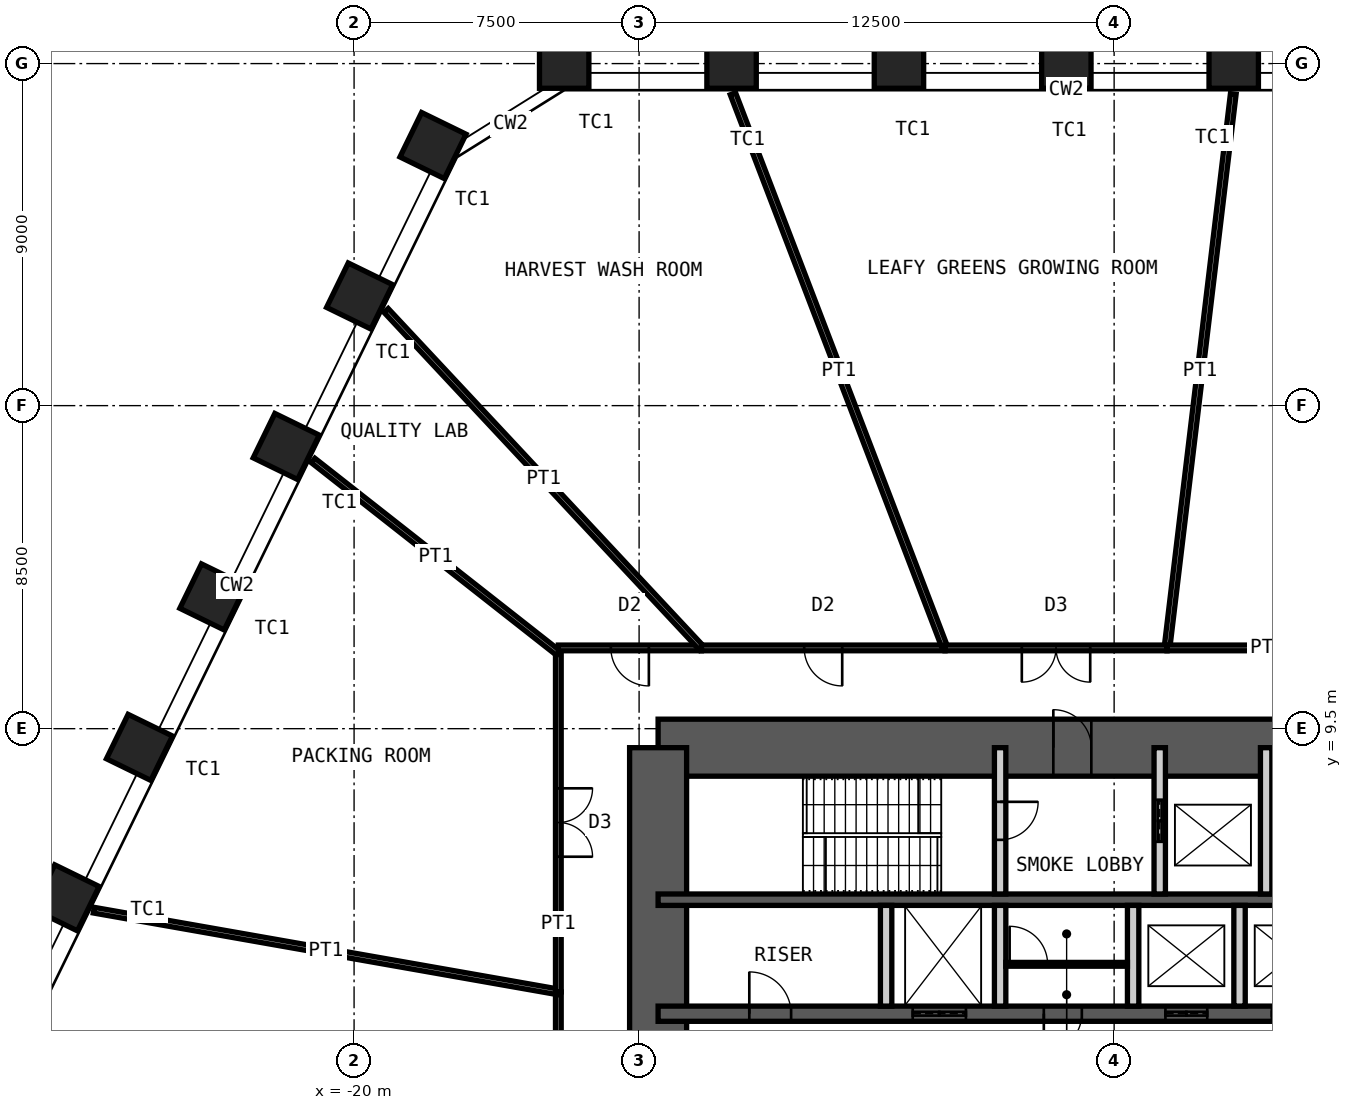
"""IFC4 building model, lengths in metres.
Left out: names, types, materials, properties, quantities, classifications, styles, units other than length and angle.
Written with IfcOpenShell. Run it as: python <this file> out.ifc"""

import sys

from ifc_helpers import new_model, si_unit, direction, frame, frame_2d, origin, origin_2d, place, context, subcontext, project, spatial, rectangle, hollow_rectangle, extrude, element, fill, save


model = new_model("IFC4")
c1 = context("Model", 3, precision=1e-05, world=origin(), true_north=direction((0.0, 1.0)))
c2 = subcontext(c1, "Body", "Model", "MODEL_VIEW")
j1 = project(units=[si_unit("LENGTHUNIT", "METRE"), si_unit("PLANEANGLEUNIT", "RADIAN")], contexts=[c1])
p1 = place(None, origin())
s1 = spatial("IfcSite", under=j1, at=p1, CompositionType="ELEMENT")
p2 = place(p1, origin())
s2 = spatial("IfcBuilding", under=s1, at=p2, CompositionType="ELEMENT")
p3 = place(p2, frame((0.0, 0.0, 37.0)))
s3 = spatial("IfcBuildingStorey", under=s2, at=p3, CompositionType="ELEMENT", Elevation=37.0)
for number, where, z_axis, x_axis in (
    (1, (-14.471, 27.0, 0.0), (0.0, 0.0, 1.0), (-1.0, 0.0, 0.0)),
    (2, (-10.067, 27.0, 0.0), (0.0, 0.0, 1.0), (-1.0, 0.0, 0.0)),
    (3, (-5.662, 27.0, 0.0), (0.0, 0.0, 1.0), (-1.0, 0.0, 0.0)),
    (4, (-1.258, 27.0, 0.0), (0.0, 0.0, 1.0), (-1.0, 0.0, 0.0)),
    (5, (3.147, 27.0, 0.0), (0.0, 0.0, 1.0), (-1.0, 0.0, 0.0)),
    (6, (-27.578, 5.049, 0.0), (0.0, 0.0, 1.0), (-0.438, -0.899, 0.0)),
    (7, (-25.647, 9.008, 0.0), (0.0, 0.0, 1.0), (-0.438, -0.899, 0.0)),
    (8, (-23.716, 12.966, 0.0), (0.0, 0.0, 1.0), (-0.438, -0.899, 0.0)),
    (9, (-21.785, 16.925, 0.0), (0.0, 0.0, 1.0), (-0.438, -0.899, 0.0)),
    (10, (-19.854, 20.884, 0.0), (0.0, 0.0, 1.0), (-0.438, -0.899, 0.0)),
    (11, (-17.924, 24.843, 0.0), (0.0, 0.0, 1.0), (-0.438, -0.899, 0.0)),
):
    element("IfcColumn", number, at=place(p3, frame(where, z_axis=z_axis, x_axis=x_axis)), inside=s3, PredefinedType="COLUMN", context=c2, shape_type="SweptSolid", body=[
        extrude(hollow_rectangle(XDim=1.3, YDim=1.3, WallThickness=0.1, at=origin_2d()), origin(), (0.0, 0.0, 1.0), 5.0),
    ])
p4 = place(p3, frame((-12.0, 9.0, 0.0), z_axis=(0.0, 0.0, 1.0), x_axis=(1.0, 0.0, 0.0)))
e12 = element("IfcWall", 12, at=p4, inside=s3, PredefinedType="SHEAR", context=c2, shape_type="SweptSolid", body=[
    extrude(rectangle(XDim=24.0, YDim=1.5, at=frame_2d((12.0, 0.0))), origin(), (0.0, 0.0, 1.0), 5.0),
])
p5 = place(p4, frame((10.4, 0.0, 0.0)))
e13 = element("IfcOpeningElement", 13, at=p5, cuts=e12, PredefinedType="OPENING", context=c2, shape_type="SweptSolid", body=[
    extrude(rectangle(XDim=1.0, YDim=2.1, at=frame_2d((0.5, 1.05))), frame((0.0, 0.76, 0.0), z_axis=(0.0, -1.0, 0.0), x_axis=(1.0, 0.0, 0.0)), (0.0, 0.0, 1.0), 1.52),
])
p6 = place(p4, frame((17.6, 0.0, 0.0)))
e14 = element("IfcOpeningElement", 14, at=p6, cuts=e12, PredefinedType="OPENING", context=c2, shape_type="SweptSolid", body=[
    extrude(rectangle(XDim=0.9, YDim=2.1, at=frame_2d((0.45, 1.05))), frame((0.0, 0.76, 0.0), z_axis=(0.0, -1.0, 0.0), x_axis=(1.0, 0.0, 0.0)), (0.0, 0.0, 1.0), 1.52),
])
p7 = place(p4, frame((21.9, 0.0, 0.0)))
e15 = element("IfcOpeningElement", 15, at=p7, cuts=e12, PredefinedType="OPENING", context=c2, shape_type="SweptSolid", body=[
    extrude(rectangle(XDim=0.9, YDim=2.1, at=frame_2d((0.45, 1.05))), frame((0.0, 0.76, 0.0), z_axis=(0.0, -1.0, 0.0), x_axis=(1.0, 0.0, 0.0)), (0.0, 0.0, 1.0), 1.52),
])
p8 = place(p3, frame((-12.0, -9.0, 0.0), z_axis=(0.0, 0.0, 1.0), x_axis=(0.0, 1.0, 0.0)))
e16 = element("IfcWall", 16, at=p8, inside=s3, PredefinedType="SHEAR", context=c2, shape_type="SweptSolid", body=[
    extrude(rectangle(XDim=18.0, YDim=1.5, at=frame_2d((9.0, 0.0))), origin(), (0.0, 0.0, 1.0), 5.0),
])
p9 = place(p8, frame((8.1, 0.0, 0.0)))
e17 = element("IfcOpeningElement", 17, at=p9, cuts=e16, PredefinedType="OPENING", context=c2, shape_type="SweptSolid", body=[
    extrude(rectangle(XDim=1.8, YDim=2.1, at=frame_2d((0.9, 1.05))), frame((0.0, 0.76, 0.0), z_axis=(0.0, -1.0, 0.0), x_axis=(1.0, 0.0, 0.0)), (0.0, 0.0, 1.0), 1.52),
])
p10 = place(p3, frame((-12.0, 5.0, 0.0), z_axis=(0.0, 0.0, 1.0), x_axis=(1.0, 0.0, 0.0)))
e18 = element("IfcWall", 18, at=p10, inside=s3, PredefinedType="SHEAR", context=c2, shape_type="SweptSolid", body=[
    extrude(rectangle(XDim=24.0, YDim=0.3, at=frame_2d((12.0, 0.0))), origin(), (0.0, 0.0, 1.0), 5.0),
])
p11 = place(p3, frame((-12.0, 2.0, 0.0), z_axis=(0.0, 0.0, 1.0), x_axis=(1.0, 0.0, 0.0)))
e19 = element("IfcWall", 19, at=p11, inside=s3, PredefinedType="SHEAR", context=c2, shape_type="SweptSolid", body=[
    extrude(rectangle(XDim=24.0, YDim=0.4, at=frame_2d((12.0, 0.0))), origin(), (0.0, 0.0, 1.0), 5.0),
])
p12 = place(p11, frame((2.4, 0.0, 0.0)))
e20 = element("IfcOpeningElement", 20, at=p12, cuts=e19, PredefinedType="OPENING", context=c2, shape_type="SweptSolid", body=[
    extrude(rectangle(XDim=1.1, YDim=2.1, at=frame_2d((0.55, 1.05))), frame((0.0, 0.21, 0.0), z_axis=(0.0, -1.0, 0.0), x_axis=(1.0, 0.0, 0.0)), (0.0, 0.0, 1.0), 0.42),
])
p13 = place(p11, frame((22.0, 0.0, 0.0)))
e21 = element("IfcOpeningElement", 21, at=p13, cuts=e19, PredefinedType="OPENING", context=c2, shape_type="SweptSolid", body=[
    extrude(rectangle(XDim=1.1, YDim=2.1, at=frame_2d((0.55, 1.05))), frame((0.0, 0.21, 0.0), z_axis=(0.0, -1.0, 0.0), x_axis=(1.0, 0.0, 0.0)), (0.0, 0.0, 1.0), 0.42),
])
p14 = place(p11, frame((10.15, 0.0, 0.0)))
e22 = element("IfcOpeningElement", 22, at=p14, cuts=e19, PredefinedType="OPENING", context=c2, shape_type="SweptSolid", body=[
    extrude(rectangle(XDim=1.0, YDim=2.1, at=frame_2d((0.5, 1.05))), frame((0.0, 0.21, 0.0), z_axis=(0.0, -1.0, 0.0), x_axis=(1.0, 0.0, 0.0)), (0.0, 0.0, 1.0), 0.42),
])
p15 = place(p11, frame((6.7, 0.0, 0.0)))
e23 = element("IfcOpeningElement", 23, at=p15, cuts=e19, PredefinedType="OPENING", context=c2, shape_type="SweptSolid", body=[
    extrude(rectangle(XDim=1.4, YDim=2.4, at=frame_2d((0.7, 1.2))), frame((0.0, 0.21, 0.0), z_axis=(0.0, -1.0, 0.0), x_axis=(1.0, 0.0, 0.0)), (0.0, 0.0, 1.0), 0.42),
])
p16 = place(p11, frame((13.35, 0.0, 0.0)))
e24 = element("IfcOpeningElement", 24, at=p16, cuts=e19, PredefinedType="OPENING", context=c2, shape_type="SweptSolid", body=[
    extrude(rectangle(XDim=1.1, YDim=2.4, at=frame_2d((0.55, 1.2))), frame((0.0, 0.21, 0.0), z_axis=(0.0, -1.0, 0.0), x_axis=(1.0, 0.0, 0.0)), (0.0, 0.0, 1.0), 0.42),
])
p17 = place(p11, frame((16.15, 0.0, 0.0)))
e25 = element("IfcOpeningElement", 25, at=p17, cuts=e19, PredefinedType="OPENING", context=c2, shape_type="SweptSolid", body=[
    extrude(rectangle(XDim=1.1, YDim=2.4, at=frame_2d((0.55, 1.2))), frame((0.0, 0.21, 0.0), z_axis=(0.0, -1.0, 0.0), x_axis=(1.0, 0.0, 0.0)), (0.0, 0.0, 1.0), 0.42),
])
p18 = place(p11, frame((18.95, 0.0, 0.0)))
e26 = element("IfcOpeningElement", 26, at=p18, cuts=e19, PredefinedType="OPENING", context=c2, shape_type="SweptSolid", body=[
    extrude(rectangle(XDim=1.1, YDim=2.4, at=frame_2d((0.55, 1.2))), frame((0.0, 0.21, 0.0), z_axis=(0.0, -1.0, 0.0), x_axis=(1.0, 0.0, 0.0)), (0.0, 0.0, 1.0), 0.42),
])
p19 = place(p3, frame((-3.0, 5.15, 0.0), z_axis=(0.0, 0.0, 1.0), x_axis=(0.0, 1.0, 0.0)))
e27 = element("IfcWall", 27, at=p19, inside=s3, PredefinedType="PARTITIONING", context=c2, shape_type="SweptSolid", body=[
    extrude(rectangle(XDim=3.85, YDim=0.3, at=frame_2d((1.925, 0.0))), origin(), (0.0, 0.0, 1.0), 4.78),
])
p20 = place(p19, frame((1.425, 0.0, 0.0)))
e28 = element("IfcOpeningElement", 28, at=p20, cuts=e27, PredefinedType="OPENING", context=c2, shape_type="SweptSolid", body=[
    extrude(rectangle(XDim=1.0, YDim=2.1, at=frame_2d((0.5, 1.05))), frame((0.0, 0.16, 0.0), z_axis=(0.0, -1.0, 0.0), x_axis=(1.0, 0.0, 0.0)), (0.0, 0.0, 1.0), 0.32),
])
p21 = place(p3, frame((1.2, 5.15, 0.0), z_axis=(0.0, 0.0, 1.0), x_axis=(0.0, 1.0, 0.0)))
e29 = element("IfcWall", 29, at=p21, inside=s3, PredefinedType="PARTITIONING", context=c2, shape_type="SweptSolid", body=[
    extrude(rectangle(XDim=3.85, YDim=0.3, at=frame_2d((1.925, 0.0))), origin(), (0.0, 0.0, 1.0), 4.78),
])
p22 = place(p21, frame((1.375, 0.0, 0.0)))
e30 = element("IfcOpeningElement", 30, at=p22, cuts=e29, PredefinedType="OPENING", context=c2, shape_type="SweptSolid", body=[
    extrude(rectangle(XDim=1.1, YDim=2.4, at=frame_2d((0.55, 1.2))), frame((0.0, 0.16, 0.0), z_axis=(0.0, -1.0, 0.0), x_axis=(1.0, 0.0, 0.0)), (0.0, 0.0, 1.0), 0.32),
])
p23 = place(p3, frame((4.0, 5.15, 0.0), z_axis=(0.0, 0.0, 1.0), x_axis=(0.0, 1.0, 0.0)))
e31 = element("IfcWall", 31, at=p23, inside=s3, PredefinedType="PARTITIONING", context=c2, shape_type="SweptSolid", body=[
    extrude(rectangle(XDim=3.85, YDim=0.3, at=frame_2d((1.925, 0.0))), origin(), (0.0, 0.0, 1.0), 4.78),
])
for number, where, z_axis, x_axis in (
    (32, (-6.0, 2.2, 0.0), (0.0, 0.0, 1.0), (0.0, 1.0, 0.0)),
    (33, (-3.0, 2.2, 0.0), (0.0, 0.0, 1.0), (0.0, 1.0, 0.0)),
    (34, (0.5, 2.2, 0.0), (0.0, 0.0, 1.0), (0.0, 1.0, 0.0)),
    (35, (3.3, 2.2, 0.0), (0.0, 0.0, 1.0), (0.0, 1.0, 0.0)),
):
    element("IfcWall", number, at=place(p3, frame(where, z_axis=z_axis, x_axis=x_axis)), inside=s3, PredefinedType="PARTITIONING", context=c2, shape_type="SweptSolid", body=[
        extrude(rectangle(XDim=2.65, YDim=0.3, at=frame_2d((1.325, 0.0))), origin(), (0.0, 0.0, 1.0), 4.78),
    ])
p24 = place(p3, frame((-2.85, 3.3, 0.0), z_axis=(0.0, 0.0, 1.0), x_axis=(1.0, 0.0, 0.0)))
e36 = element("IfcWall", 36, at=p24, inside=s3, PredefinedType="PARTITIONING", context=c2, shape_type="SweptSolid", body=[
    extrude(rectangle(XDim=3.2, YDim=0.1, at=frame_2d((1.6, 0.0))), origin(), (0.0, 0.0, 1.0), 4.78),
])
p25 = place(p24, frame((0.1, 0.0, 0.0)))
e37 = element("IfcOpeningElement", 37, at=p25, cuts=e36, PredefinedType="OPENING", context=c2, shape_type="SweptSolid", body=[
    extrude(rectangle(XDim=1.0, YDim=2.4, at=frame_2d((0.5, 1.2))), frame((0.0, 0.06, 0.0), z_axis=(0.0, -1.0, 0.0), x_axis=(1.0, 0.0, 0.0)), (0.0, 0.0, 1.0), 0.12),
])
p26 = place(p3, frame((3.135, 26.201, 0.0), z_axis=(0.0, 0.0, 1.0), x_axis=(-0.118796980211, -0.992918565388, 0.0)))
e38 = element("IfcWall", 38, at=p26, inside=s3, PredefinedType="PARTITIONING", context=c2, shape_type="SweptSolid", body=[
    extrude(rectangle(XDim=14.68, YDim=0.15, at=frame_2d((7.34, 0.0))), origin(), (0.0, 0.0, 1.0), 3.7),
])
p27 = place(p3, frame((1.391, 11.625, 0.0), z_axis=(0.0, 0.0, 1.0), x_axis=(1.0, 0.0, 0.0)))
e39 = element("IfcWall", 39, at=p27, inside=s3, PredefinedType="PARTITIONING", context=c2, shape_type="SweptSolid", body=[
    extrude(rectangle(XDim=13.234, YDim=0.15, at=frame_2d((6.617, 0.0))), origin(), (0.0, 0.0, 1.0), 4.8),
])
p28 = place(p27, frame((5.717, 0.0, 0.0)))
e40 = element("IfcOpeningElement", 40, at=p28, cuts=e39, PredefinedType="OPENING", context=c2, shape_type="SweptSolid", body=[
    extrude(rectangle(XDim=1.8, YDim=2.4, at=frame_2d((0.9, 1.2))), frame((0.0, 0.085, 0.0), z_axis=(0.0, -1.0, 0.0), x_axis=(1.0, 0.0, 0.0)), (0.0, 0.0, 1.0), 0.17),
])
p29 = place(p3, frame((-14.625, -3.641, 0.0), z_axis=(0.0, 0.0, 1.0), x_axis=(0.0, 1.0, 0.0)))
e41 = element("IfcWall", 41, at=p29, inside=s3, PredefinedType="PARTITIONING", context=c2, shape_type="SweptSolid", body=[
    extrude(rectangle(XDim=6.214, YDim=0.15, at=frame_2d((3.107, 0.0))), origin(), (0.0, 0.0, 1.0), 4.8),
])
p30 = place(p29, frame((2.607, 0.0, 0.0)))
e42 = element("IfcOpeningElement", 42, at=p30, cuts=e41, PredefinedType="OPENING", context=c2, shape_type="SweptSolid", body=[
    extrude(rectangle(XDim=1.0, YDim=2.4, at=frame_2d((0.5, 1.2))), frame((0.0, 0.085, 0.0), z_axis=(0.0, -1.0, 0.0), x_axis=(1.0, 0.0, 0.0)), (0.0, 0.0, 1.0), 0.17),
])
p31 = place(p3, frame((-26.85, 4.725, 0.0), z_axis=(0.0, 0.0, 1.0), x_axis=(0.984869569104, -0.173297235559, 0.0)))
e43 = element("IfcWall", 43, at=p31, inside=s3, PredefinedType="PARTITIONING", context=c2, shape_type="SweptSolid", body=[
    extrude(rectangle(XDim=12.413, YDim=0.15, at=frame_2d((6.207, 0.0))), origin(), (0.0, 0.0, 1.0), 3.7),
])
p32 = place(p3, frame((-14.625, 2.573, 0.0), z_axis=(0.0, 0.0, 1.0), x_axis=(0.0, 1.0, 0.0)))
e44 = element("IfcWall", 44, at=p32, inside=s3, PredefinedType="PARTITIONING", context=c2, shape_type="SweptSolid", body=[
    extrude(rectangle(XDim=8.915, YDim=0.15, at=frame_2d((4.457, 0.0))), origin(), (0.0, 0.0, 1.0), 4.8),
])
p33 = place(p32, frame((3.557, 0.0, 0.0)))
e45 = element("IfcOpeningElement", 45, at=p33, cuts=e44, PredefinedType="OPENING", context=c2, shape_type="SweptSolid", body=[
    extrude(rectangle(XDim=1.8, YDim=2.4, at=frame_2d((0.9, 1.2))), frame((0.0, 0.085, 0.0), z_axis=(0.0, -1.0, 0.0), x_axis=(1.0, 0.0, 0.0)), (0.0, 0.0, 1.0), 0.17),
])
p34 = place(p3, frame((-21.077, 16.557, 0.0), z_axis=(0.0, 0.0, 1.0), x_axis=(0.786385446389, -0.617736132752, 0.0)))
e46 = element("IfcWall", 46, at=p34, inside=s3, PredefinedType="PARTITIONING", context=c2, shape_type="SweptSolid", body=[
    extrude(rectangle(XDim=8.205, YDim=0.15, at=frame_2d((4.103, 0.0))), origin(), (0.0, 0.0, 1.0), 3.7),
])
p35 = place(p3, frame((-14.625, 11.625, 0.0), z_axis=(0.0, 0.0, 1.0), x_axis=(1.0, 0.0, 0.0)))
e47 = element("IfcWall", 47, at=p35, inside=s3, PredefinedType="PARTITIONING", context=c2, shape_type="SweptSolid", body=[
    extrude(rectangle(XDim=3.764, YDim=0.15, at=frame_2d((1.882, 0.0))), origin(), (0.0, 0.0, 1.0), 4.8),
])
p36 = place(p35, frame((1.382, 0.0, 0.0)))
e48 = element("IfcOpeningElement", 48, at=p36, cuts=e47, PredefinedType="OPENING", context=c2, shape_type="SweptSolid", body=[
    extrude(rectangle(XDim=1.0, YDim=2.4, at=frame_2d((0.5, 1.2))), frame((0.0, 0.085, 0.0), z_axis=(0.0, -1.0, 0.0), x_axis=(1.0, 0.0, 0.0)), (0.0, 0.0, 1.0), 0.17),
])
p37 = place(p3, frame((-19.157, 20.504, 0.0), z_axis=(0.0, 0.0, 1.0), x_axis=(0.682689688298, -0.73070841619, 0.0)))
e49 = element("IfcWall", 49, at=p37, inside=s3, PredefinedType="PARTITIONING", context=c2, shape_type="SweptSolid", body=[
    extrude(rectangle(XDim=12.151, YDim=0.15, at=frame_2d((6.076, 0.0))), origin(), (0.0, 0.0, 1.0), 3.7),
])
p38 = place(p3, frame((-10.861, 11.625, 0.0), z_axis=(0.0, 0.0, 1.0), x_axis=(1.0, 0.0, 0.0)))
e50 = element("IfcWall", 50, at=p38, inside=s3, PredefinedType="PARTITIONING", context=c2, shape_type="SweptSolid", body=[
    extrude(rectangle(XDim=6.412, YDim=0.15, at=frame_2d((3.206, 0.0))), origin(), (0.0, 0.0, 1.0), 4.8),
])
p39 = place(p38, frame((2.706, 0.0, 0.0)))
e51 = element("IfcOpeningElement", 51, at=p39, cuts=e50, PredefinedType="OPENING", context=c2, shape_type="SweptSolid", body=[
    extrude(rectangle(XDim=1.0, YDim=2.4, at=frame_2d((0.5, 1.2))), frame((0.0, 0.085, 0.0), z_axis=(0.0, -1.0, 0.0), x_axis=(1.0, 0.0, 0.0)), (0.0, 0.0, 1.0), 0.17),
])
p40 = place(p3, frame((-10.031, 26.207, 0.0), z_axis=(0.0, 0.0, 1.0), x_axis=(0.35747288505, -0.933923517454, 0.0)))
e52 = element("IfcWall", 52, at=p40, inside=s3, PredefinedType="PARTITIONING", context=c2, shape_type="SweptSolid", body=[
    extrude(rectangle(XDim=15.613, YDim=0.15, at=frame_2d((7.807, 0.0))), origin(), (0.0, 0.0, 1.0), 3.7),
])
p41 = place(p3, frame((-4.45, 11.625, 0.0), z_axis=(0.0, 0.0, 1.0), x_axis=(1.0, 0.0, 0.0)))
e53 = element("IfcWall", 53, at=p41, inside=s3, PredefinedType="PARTITIONING", context=c2, shape_type="SweptSolid", body=[
    extrude(rectangle(XDim=5.841, YDim=0.15, at=frame_2d((2.92, 0.0))), origin(), (0.0, 0.0, 1.0), 4.8),
])
p42 = place(p41, frame((2.02, 0.0, 0.0)))
e54 = element("IfcOpeningElement", 54, at=p42, cuts=e53, PredefinedType="OPENING", context=c2, shape_type="SweptSolid", body=[
    extrude(rectangle(XDim=1.8, YDim=2.4, at=frame_2d((0.9, 1.2))), frame((0.0, 0.085, 0.0), z_axis=(0.0, -1.0, 0.0), x_axis=(1.0, 0.0, 0.0)), (0.0, 0.0, 1.0), 0.17),
])
p43 = place(p5, origin())
e55 = element("IfcDoor", 55, at=p43, inside=s3, OperationType="SINGLE_SWING_RIGHT", PredefinedType="DOOR", context=c2, shape_type="SweptSolid", body=[
    extrude(rectangle(XDim=1.0, YDim=2.1, at=frame_2d((0.5, 1.05))), frame((0.0, 0.025, 0.0), z_axis=(0.0, -1.0, 0.0), x_axis=(1.0, 0.0, 0.0)), (0.0, 0.0, 1.0), 0.05),
])
fill(e13, e55)
p44 = place(p20, origin())
e56 = element("IfcDoor", 56, at=p44, inside=s3, OperationType="SINGLE_SWING_RIGHT", PredefinedType="DOOR", context=c2, shape_type="SweptSolid", body=[
    extrude(rectangle(XDim=1.0, YDim=2.1, at=frame_2d((0.5, 1.05))), frame((0.0, 0.025, 0.0), z_axis=(0.0, -1.0, 0.0), x_axis=(1.0, 0.0, 0.0)), (0.0, 0.0, 1.0), 0.05),
])
fill(e28, e56)
p45 = place(p12, origin())
e57 = element("IfcDoor", 57, at=p45, inside=s3, OperationType="SINGLE_SWING_RIGHT", PredefinedType="DOOR", context=c2, shape_type="SweptSolid", body=[
    extrude(rectangle(XDim=1.1, YDim=2.1, at=frame_2d((0.55, 1.05))), frame((0.0, 0.025, 0.0), z_axis=(0.0, -1.0, 0.0), x_axis=(1.0, 0.0, 0.0)), (0.0, 0.0, 1.0), 0.05),
])
fill(e20, e57)
p46 = place(p14, origin())
e58 = element("IfcDoor", 58, at=p46, inside=s3, OperationType="SINGLE_SWING_LEFT", PredefinedType="DOOR", context=c2, shape_type="SweptSolid", body=[
    extrude(rectangle(XDim=1.0, YDim=2.1, at=frame_2d((0.5, 1.05))), frame((0.0, 0.025, 0.0), z_axis=(0.0, -1.0, 0.0), x_axis=(1.0, 0.0, 0.0)), (0.0, 0.0, 1.0), 0.05),
])
fill(e22, e58)
p47 = place(p22, origin())
e59 = element("IfcDoor", 59, at=p47, inside=s3, OperationType="DOUBLE_DOOR_SLIDING", PredefinedType="DOOR", context=c2, shape_type="SweptSolid", body=[
    extrude(rectangle(XDim=1.1, YDim=2.4, at=frame_2d((0.55, 1.2))), frame((0.0, 0.025, 0.0), z_axis=(0.0, -1.0, 0.0), x_axis=(1.0, 0.0, 0.0)), (0.0, 0.0, 1.0), 0.05),
])
fill(e30, e59)
p48 = place(p15, origin())
e60 = element("IfcDoor", 60, at=p48, inside=s3, OperationType="DOUBLE_DOOR_SLIDING", PredefinedType="DOOR", context=c2, shape_type="SweptSolid", body=[
    extrude(rectangle(XDim=1.4, YDim=2.4, at=frame_2d((0.7, 1.2))), frame((0.0, 0.025, 0.0), z_axis=(0.0, -1.0, 0.0), x_axis=(1.0, 0.0, 0.0)), (0.0, 0.0, 1.0), 0.05),
])
fill(e23, e60)
p49 = place(p16, origin())
e61 = element("IfcDoor", 61, at=p49, inside=s3, OperationType="DOUBLE_DOOR_SLIDING", PredefinedType="DOOR", context=c2, shape_type="SweptSolid", body=[
    extrude(rectangle(XDim=1.1, YDim=2.4, at=frame_2d((0.55, 1.2))), frame((0.0, 0.025, 0.0), z_axis=(0.0, -1.0, 0.0), x_axis=(1.0, 0.0, 0.0)), (0.0, 0.0, 1.0), 0.05),
])
fill(e24, e61)
p50 = place(p25, origin())
e62 = element("IfcDoor", 62, at=p50, inside=s3, OperationType="SINGLE_SWING_RIGHT", PredefinedType="DOOR", context=c2, shape_type="SweptSolid", body=[
    extrude(rectangle(XDim=1.0, YDim=2.4, at=frame_2d((0.5, 1.2))), frame((0.0, 0.025, 0.0), z_axis=(0.0, -1.0, 0.0), x_axis=(1.0, 0.0, 0.0)), (0.0, 0.0, 1.0), 0.05),
])
fill(e37, e62)
p51 = place(p33, origin())
e63 = element("IfcDoor", 63, at=p51, inside=s3, OperationType="DOUBLE_DOOR_DOUBLE_SWING", PredefinedType="DOOR", context=c2, shape_type="SweptSolid", body=[
    extrude(rectangle(XDim=1.8, YDim=2.4, at=frame_2d((0.9, 1.2))), frame((0.0, 0.025, 0.0), z_axis=(0.0, -1.0, 0.0), x_axis=(1.0, 0.0, 0.0)), (0.0, 0.0, 1.0), 0.05),
])
fill(e45, e63)
p52 = place(p36, origin())
e64 = element("IfcDoor", 64, at=p52, inside=s3, OperationType="SINGLE_SWING_RIGHT", PredefinedType="DOOR", context=c2, shape_type="SweptSolid", body=[
    extrude(rectangle(XDim=1.0, YDim=2.4, at=frame_2d((0.5, 1.2))), frame((0.0, 0.025, 0.0), z_axis=(0.0, -1.0, 0.0), x_axis=(1.0, 0.0, 0.0)), (0.0, 0.0, 1.0), 0.05),
])
fill(e48, e64)
p53 = place(p39, origin())
e65 = element("IfcDoor", 65, at=p53, inside=s3, OperationType="SINGLE_SWING_RIGHT", PredefinedType="DOOR", context=c2, shape_type="SweptSolid", body=[
    extrude(rectangle(XDim=1.0, YDim=2.4, at=frame_2d((0.5, 1.2))), frame((0.0, 0.025, 0.0), z_axis=(0.0, -1.0, 0.0), x_axis=(1.0, 0.0, 0.0)), (0.0, 0.0, 1.0), 0.05),
])
fill(e51, e65)
p54 = place(p42, origin())
e66 = element("IfcDoor", 66, at=p54, inside=s3, OperationType="DOUBLE_DOOR_DOUBLE_SWING", PredefinedType="DOOR", context=c2, shape_type="SweptSolid", body=[
    extrude(rectangle(XDim=1.8, YDim=2.4, at=frame_2d((0.9, 1.2))), frame((0.0, 0.025, 0.0), z_axis=(0.0, -1.0, 0.0), x_axis=(1.0, 0.0, 0.0)), (0.0, 0.0, 1.0), 0.05),
])
fill(e54, e66)
save(model, sys.argv[1])
